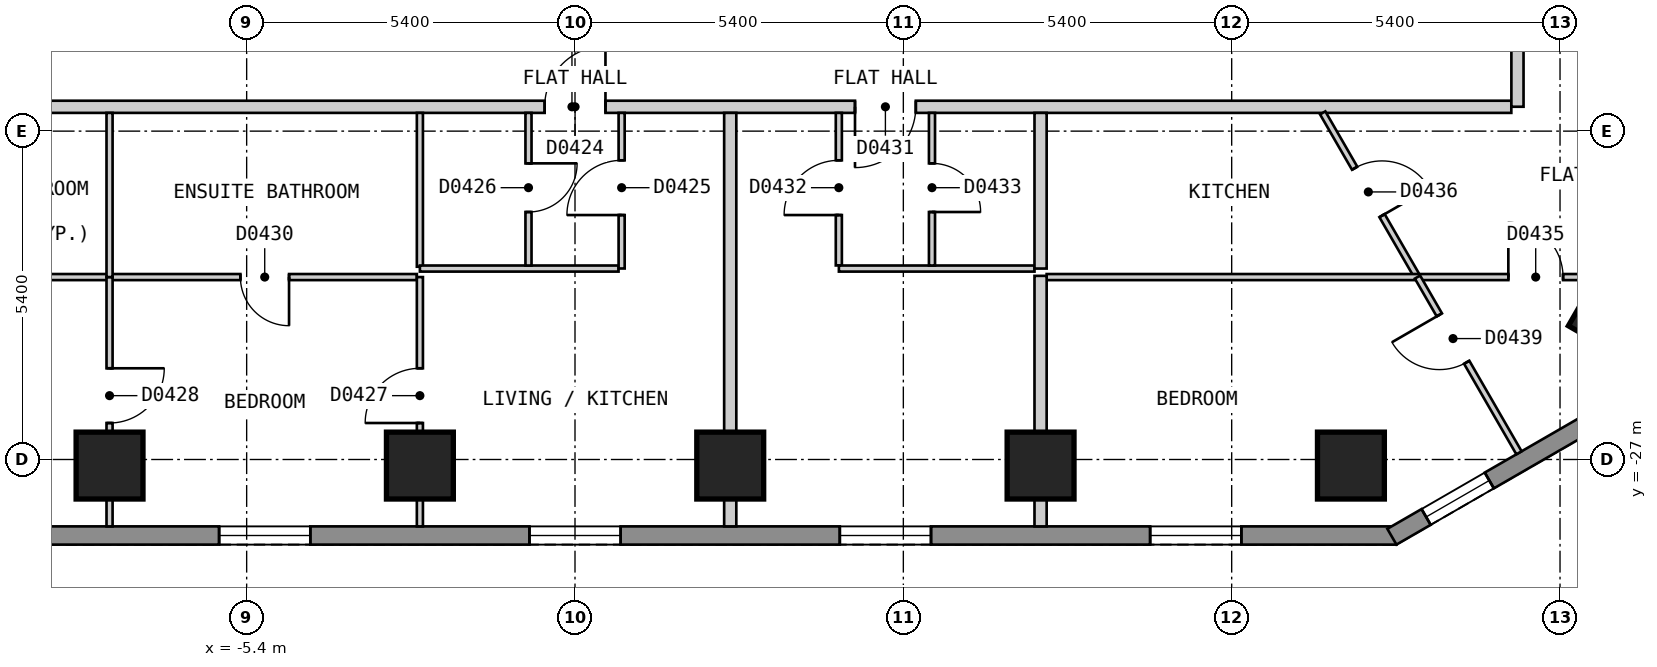
"""IFC4 building model, lengths in metres.
Left out: names, types, materials, properties, quantities, classifications, styles, units other than length and angle.
Written with IfcOpenShell. Run it as: python <this file> out.ifc"""

import sys

from ifc_helpers import new_model, si_unit, direction, frame, frame_2d, origin, origin_2d, place, context, subcontext, project, spatial, polyline, rectangle, outline, extrude, element, fill, save


model = new_model("IFC4")
c1 = context("Model", 3, precision=1e-05, world=origin(), true_north=direction((0.0, 1.0)))
c2 = subcontext(c1, "Body", "Model", "MODEL_VIEW")
j1 = project(units=[si_unit("LENGTHUNIT", "METRE"), si_unit("PLANEANGLEUNIT", "RADIAN")], contexts=[c1])
p1 = place(None, origin())
s1 = spatial("IfcSite", under=j1, at=p1, CompositionType="ELEMENT")
p2 = place(p1, origin())
s2 = spatial("IfcBuilding", under=s1, at=p2, CompositionType="ELEMENT")
p3 = place(p2, frame((0.0, 0.0, 26.4)))
s3 = spatial("IfcBuildingStorey", under=s2, at=p3, CompositionType="ELEMENT", Elevation=26.4)
for number, where, z_axis, x_axis in (
    (1, (-7.655, -27.1, 0.0), (0.0, 0.0, 1.0), (1.0, 0.0, 0.0)),
    (2, (-2.551, -27.1, 0.0), (0.0, 0.0, 1.0), (1.0, 0.0, 0.0)),
    (3, (2.553, -27.1, 0.0), (0.0, 0.0, 1.0), (1.0, 0.0, 0.0)),
    (4, (7.657, -27.1, 0.0), (0.0, 0.0, 1.0), (1.0, 0.0, 0.0)),
    (5, (12.761, -27.1, 0.0), (0.0, 0.0, 1.0), (1.0, 0.0, 0.0)),
    (6, (17.09, -24.6, 0.0), (0.0, 0.0, 1.0), (0.5, 0.866, 0.0)),
):
    element("IfcColumn", number, at=place(p3, frame(where, z_axis=z_axis, x_axis=x_axis)), inside=s3, PredefinedType="COLUMN", context=c2, shape_type="SweptSolid", body=[
        extrude(rectangle(XDim=1.1, YDim=1.1, at=origin_2d()), origin(), (0.0, 0.0, 1.0), 3.0),
    ])
p4 = place(p3, frame((-13.51, -28.25, 0.0), z_axis=(0.0, 0.0, 1.0), x_axis=(1.0, 0.0, 0.0)))
e7 = element("IfcWall", 7, at=p4, inside=s3, PredefinedType="SOLIDWALL", context=c2, shape_type="SweptSolid", body=[
    extrude(outline(polyline([(0.0, -0.15), (27.02, -0.15), (26.94, 0.15), (0.08, 0.15), (0.0, -0.15)])), origin(), (0.0, 0.0, 1.0), 2.7),
])
p5 = place(p4, frame((2.553, 0.0, 0.15)))
e8 = element("IfcOpeningElement", 8, at=p5, cuts=e7, PredefinedType="OPENING", context=c2, shape_type="SweptSolid", body=[
    extrude(rectangle(XDim=1.5, YDim=2.1, at=frame_2d((0.75, 1.05))), frame((0.0, 0.16, 0.0), z_axis=(0.0, -1.0, 0.0), x_axis=(1.0, 0.0, 0.0)), (0.0, 0.0, 1.0), 0.32),
])
p6 = place(p4, frame((7.657, 0.0, 0.15)))
e9 = element("IfcOpeningElement", 9, at=p6, cuts=e7, PredefinedType="OPENING", context=c2, shape_type="SweptSolid", body=[
    extrude(rectangle(XDim=1.5, YDim=2.1, at=frame_2d((0.75, 1.05))), frame((0.0, 0.16, 0.0), z_axis=(0.0, -1.0, 0.0), x_axis=(1.0, 0.0, 0.0)), (0.0, 0.0, 1.0), 0.32),
])
p7 = place(p4, frame((12.761, 0.0, 0.15)))
e10 = element("IfcOpeningElement", 10, at=p7, cuts=e7, PredefinedType="OPENING", context=c2, shape_type="SweptSolid", body=[
    extrude(rectangle(XDim=1.5, YDim=2.1, at=frame_2d((0.75, 1.05))), frame((0.0, 0.16, 0.0), z_axis=(0.0, -1.0, 0.0), x_axis=(1.0, 0.0, 0.0)), (0.0, 0.0, 1.0), 0.32),
])
p8 = place(p4, frame((17.865, 0.0, 0.15)))
e11 = element("IfcOpeningElement", 11, at=p8, cuts=e7, PredefinedType="OPENING", context=c2, shape_type="SweptSolid", body=[
    extrude(rectangle(XDim=1.5, YDim=2.1, at=frame_2d((0.75, 1.05))), frame((0.0, 0.16, 0.0), z_axis=(0.0, -1.0, 0.0), x_axis=(1.0, 0.0, 0.0)), (0.0, 0.0, 1.0), 0.32),
])
p9 = place(p4, frame((22.969, 0.0, 0.15)))
e12 = element("IfcOpeningElement", 12, at=p9, cuts=e7, PredefinedType="OPENING", context=c2, shape_type="SweptSolid", body=[
    extrude(rectangle(XDim=1.5, YDim=2.1, at=frame_2d((0.75, 1.05))), frame((0.0, 0.16, 0.0), z_axis=(0.0, -1.0, 0.0), x_axis=(1.0, 0.0, 0.0)), (0.0, 0.0, 1.0), 0.32),
])
p10 = place(p3, frame((13.435, -28.27, 0.0), z_axis=(0.0, 0.0, 1.0), x_axis=(0.866010750942, 0.50002537861, 0.0)))
e13 = element("IfcWall", 13, at=p10, inside=s3, PredefinedType="SOLIDWALL", context=c2, shape_type="SweptSolid", body=[
    extrude(outline(polyline([(0.0, -0.15), (5.0, -0.15), (4.919, 0.15), (0.08, 0.15), (0.0, -0.15)])), origin(), (0.0, 0.0, 1.0), 2.7),
])
p11 = place(p10, frame((0.65, 0.0, 0.15)))
e14 = element("IfcOpeningElement", 14, at=p11, cuts=e13, PredefinedType="OPENING", context=c2, shape_type="SweptSolid", body=[
    extrude(rectangle(XDim=1.2, YDim=2.1, at=frame_2d((0.6, 1.05))), frame((0.0, 0.16, 0.0), z_axis=(0.0, -1.0, 0.0), x_axis=(1.0, 0.0, 0.0)), (0.0, 0.0, 1.0), 0.32),
])
p12 = place(p3, frame((-15.499, -21.2, 0.0), z_axis=(0.0, 0.0, 1.0), x_axis=(1.0, 0.0, 0.0)))
e15 = element("IfcWall", 15, at=p12, inside=s3, PredefinedType="PARTITIONING", context=c2, shape_type="SweptSolid", body=[
    extrude(rectangle(XDim=30.898, YDim=0.2, at=frame_2d((15.449, 0.0))), origin(), (0.0, 0.0, 1.0), 2.7),
])
p13 = place(p12, frame((15.0, 0.0, 0.0)))
e16 = element("IfcOpeningElement", 16, at=p13, cuts=e15, PredefinedType="OPENING", context=c2, shape_type="SweptSolid", body=[
    extrude(rectangle(XDim=1.0, YDim=2.1, at=frame_2d((0.5, 1.05))), frame((0.0, 0.11, 0.0), z_axis=(0.0, -1.0, 0.0), x_axis=(1.0, 0.0, 0.0)), (0.0, 0.0, 1.0), 0.22),
])
p14 = place(p12, frame((20.104, 0.0, 0.0)))
e17 = element("IfcOpeningElement", 17, at=p14, cuts=e15, PredefinedType="OPENING", context=c2, shape_type="SweptSolid", body=[
    extrude(rectangle(XDim=1.0, YDim=2.1, at=frame_2d((0.5, 1.05))), frame((0.0, 0.11, 0.0), z_axis=(0.0, -1.0, 0.0), x_axis=(1.0, 0.0, 0.0)), (0.0, 0.0, 1.0), 0.22),
])
p15 = place(p3, frame((15.5, -21.199, 0.0), z_axis=(0.0, 0.0, 1.0), x_axis=(0.0, 1.0, 0.0)))
e18 = element("IfcWall", 18, at=p15, inside=s3, PredefinedType="PARTITIONING", context=c2, shape_type="SweptSolid", body=[
    extrude(rectangle(XDim=7.575, YDim=0.2, at=frame_2d((3.788, 0.0))), origin(), (0.0, 0.0, 1.0), 2.7),
])
p16 = place(p15, frame((1.188, 0.0, 0.0)))
e19 = element("IfcOpeningElement", 19, at=p16, cuts=e18, PredefinedType="OPENING", context=c2, shape_type="SweptSolid", body=[
    extrude(rectangle(XDim=1.0, YDim=2.1, at=frame_2d((0.5, 1.05))), frame((0.0, 0.11, 0.0), z_axis=(0.0, -1.0, 0.0), x_axis=(1.0, 0.0, 0.0)), (0.0, 0.0, 1.0), 0.22),
])
p17 = place(p3, frame((12.297, -21.3, 0.0), z_axis=(0.0, 0.0, 1.0), x_axis=(0.500004896655, -0.866022576681, 0.0)))
e20 = element("IfcWall", 20, at=p17, inside=s3, PredefinedType="PARTITIONING", context=c2, shape_type="SweptSolid", body=[
    extrude(rectangle(XDim=3.118, YDim=0.1, at=frame_2d((1.559, 0.0))), origin(), (0.0, 0.0, 1.0), 2.7),
])
p18 = place(p17, frame((1.051, 0.0, 0.0)))
e21 = element("IfcOpeningElement", 21, at=p18, cuts=e20, PredefinedType="OPENING", context=c2, shape_type="SweptSolid", body=[
    extrude(rectangle(XDim=0.9, YDim=2.1, at=frame_2d((0.45, 1.05))), frame((0.0, 0.06, 0.0), z_axis=(0.0, -1.0, 0.0), x_axis=(1.0, 0.0, 0.0)), (0.0, 0.0, 1.0), 0.12),
])
p19 = place(p3, frame((-2.551, -21.3, 0.0), z_axis=(0.0, 0.0, 1.0), x_axis=(0.0, -1.0, 0.0)))
e22 = element("IfcWall", 22, at=p19, inside=s3, PredefinedType="PARTITIONING", context=c2, shape_type="SweptSolid", body=[
    extrude(rectangle(XDim=2.53, YDim=0.1, at=frame_2d((1.265, 0.0))), origin(), (0.0, 0.0, 1.0), 2.7),
])
p20 = place(p3, frame((4.339, -21.3, 0.0), z_axis=(0.0, 0.0, 1.0), x_axis=(0.0, -1.0, 0.0)))
e23 = element("IfcWall", 23, at=p20, inside=s3, PredefinedType="PARTITIONING", context=c2, shape_type="SweptSolid", body=[
    extrude(rectangle(XDim=2.509, YDim=0.1, at=frame_2d((1.254, 0.0))), origin(), (0.0, 0.0, 1.0), 2.7),
])
p21 = place(p20, frame((0.78, 0.0, 0.0)))
e24 = element("IfcOpeningElement", 24, at=p21, cuts=e23, PredefinedType="OPENING", context=c2, shape_type="SweptSolid", body=[
    extrude(rectangle(XDim=0.9, YDim=2.1, at=frame_2d((0.45, 1.05))), frame((0.0, 0.06, 0.0), z_axis=(0.0, -1.0, 0.0), x_axis=(1.0, 0.0, 0.0)), (0.0, 0.0, 1.0), 0.12),
])
p22 = place(p3, frame((-2.551, -23.86, 0.0), z_axis=(0.0, 0.0, 1.0), x_axis=(1.0, 0.0, 0.0)))
e25 = element("IfcWall", 25, at=p22, inside=s3, PredefinedType="PARTITIONING", context=c2, shape_type="SweptSolid", body=[
    extrude(rectangle(XDim=3.267, YDim=0.1, at=frame_2d((1.634, 0.0))), origin(), (0.0, 0.0, 1.0), 2.7),
])
p23 = place(p3, frame((4.34, -23.86, 0.0), z_axis=(0.0, 0.0, 1.0), x_axis=(1.0, 0.0, 0.0)))
e26 = element("IfcWall", 26, at=p23, inside=s3, PredefinedType="PARTITIONING", context=c2, shape_type="SweptSolid", body=[
    extrude(rectangle(XDim=3.217, YDim=0.1, at=frame_2d((1.608, 0.0))), origin(), (0.0, 0.0, 1.0), 2.7),
])
p24 = place(p3, frame((-15.848, -24.0, 0.0), z_axis=(0.0, 0.0, 1.0), x_axis=(1.0, 0.0, 0.0)))
e27 = element("IfcWall", 27, at=p24, inside=s3, PredefinedType="PARTITIONING", context=c2, shape_type="SweptSolid", body=[
    extrude(rectangle(XDim=13.247, YDim=0.1, at=frame_2d((6.624, 0.0))), origin(), (0.0, 0.0, 1.0), 2.7),
])
p25 = place(p24, frame((3.596, 0.0, 0.0)))
e28 = element("IfcOpeningElement", 28, at=p25, cuts=e27, PredefinedType="OPENING", context=c2, shape_type="SweptSolid", body=[
    extrude(rectangle(XDim=0.8, YDim=2.1, at=frame_2d((0.4, 1.05))), frame((0.0, 0.06, 0.0), z_axis=(0.0, -1.0, 0.0), x_axis=(1.0, 0.0, 0.0)), (0.0, 0.0, 1.0), 0.12),
])
p26 = place(p24, frame((10.345, 0.0, 0.0)))
e29 = element("IfcOpeningElement", 29, at=p26, cuts=e27, PredefinedType="OPENING", context=c2, shape_type="SweptSolid", body=[
    extrude(rectangle(XDim=0.8, YDim=2.1, at=frame_2d((0.4, 1.05))), frame((0.0, 0.06, 0.0), z_axis=(0.0, -1.0, 0.0), x_axis=(1.0, 0.0, 0.0)), (0.0, 0.0, 1.0), 0.12),
])
p27 = place(p3, frame((7.757, -24.0, 0.0), z_axis=(0.0, 0.0, 1.0), x_axis=(1.0, 0.0, 0.0)))
e30 = element("IfcWall", 30, at=p27, inside=s3, PredefinedType="PARTITIONING", context=c2, shape_type="SweptSolid", body=[
    extrude(rectangle(XDim=10.493, YDim=0.1, at=frame_2d((5.247, 0.0))), origin(), (0.0, 0.0, 1.0), 2.7),
])
p28 = place(p27, frame((7.593, 0.0, 0.0)))
e31 = element("IfcOpeningElement", 31, at=p28, cuts=e30, PredefinedType="OPENING", context=c2, shape_type="SweptSolid", body=[
    extrude(rectangle(XDim=0.9, YDim=2.1, at=frame_2d((0.45, 1.05))), frame((0.0, 0.06, 0.0), z_axis=(0.0, -1.0, 0.0), x_axis=(1.0, 0.0, 0.0)), (0.0, 0.0, 1.0), 0.12),
])
p29 = place(p3, frame((5.871, -23.81, 0.0), z_axis=(0.0, 0.0, 1.0), x_axis=(0.0, 1.0, 0.0)))
e32 = element("IfcWall", 32, at=p29, inside=s3, PredefinedType="PARTITIONING", context=c2, shape_type="SweptSolid", body=[
    extrude(rectangle(XDim=2.51, YDim=0.1, at=frame_2d((1.255, 0.0))), origin(), (0.0, 0.0, 1.0), 2.7),
])
p30 = place(p29, frame((0.88, 0.0, 0.0)))
e33 = element("IfcOpeningElement", 33, at=p30, cuts=e32, PredefinedType="OPENING", context=c2, shape_type="SweptSolid", body=[
    extrude(rectangle(XDim=0.8, YDim=2.1, at=frame_2d((0.4, 1.05))), frame((0.0, 0.06, 0.0), z_axis=(0.0, -1.0, 0.0), x_axis=(1.0, 0.0, 0.0)), (0.0, 0.0, 1.0), 0.12),
])
p31 = place(p3, frame((0.767, -23.859, 0.0), z_axis=(0.0, 0.0, 1.0), x_axis=(0.0, 1.0, 0.0)))
e34 = element("IfcWall", 34, at=p31, inside=s3, PredefinedType="PARTITIONING", context=c2, shape_type="SweptSolid", body=[
    extrude(rectangle(XDim=2.559, YDim=0.1, at=frame_2d((1.279, 0.0))), origin(), (0.0, 0.0, 1.0), 2.7),
])
p32 = place(p31, frame((0.879, 0.0, 0.0)))
e35 = element("IfcOpeningElement", 35, at=p32, cuts=e34, PredefinedType="OPENING", context=c2, shape_type="SweptSolid", body=[
    extrude(rectangle(XDim=0.9, YDim=2.1, at=frame_2d((0.45, 1.05))), frame((0.0, 0.06, 0.0), z_axis=(0.0, -1.0, 0.0), x_axis=(1.0, 0.0, 0.0)), (0.0, 0.0, 1.0), 0.12),
])
p33 = place(p3, frame((-0.765, -23.81, 0.0), z_axis=(0.0, 0.0, 1.0), x_axis=(0.0, 1.0, 0.0)))
e36 = element("IfcWall", 36, at=p33, inside=s3, PredefinedType="PARTITIONING", context=c2, shape_type="SweptSolid", body=[
    extrude(rectangle(XDim=2.51, YDim=0.1, at=frame_2d((1.255, 0.0))), origin(), (0.0, 0.0, 1.0), 2.7),
])
p34 = place(p33, frame((0.88, 0.0, 0.0)))
e37 = element("IfcOpeningElement", 37, at=p34, cuts=e36, PredefinedType="OPENING", context=c2, shape_type="SweptSolid", body=[
    extrude(rectangle(XDim=0.8, YDim=2.1, at=frame_2d((0.4, 1.05))), frame((0.0, 0.06, 0.0), z_axis=(0.0, -1.0, 0.0), x_axis=(1.0, 0.0, 0.0)), (0.0, 0.0, 1.0), 0.12),
])
p35 = place(p3, frame((-7.655, -28.1, 0.0), z_axis=(0.0, 0.0, 1.0), x_axis=(0.0, 1.0, 0.0)))
e38 = element("IfcWall", 38, at=p35, inside=s3, PredefinedType="PARTITIONING", context=c2, shape_type="SweptSolid", body=[
    extrude(rectangle(XDim=4.1, YDim=0.1, at=frame_2d((2.05, 0.0))), origin(), (0.0, 0.0, 1.0), 2.7),
])
p36 = place(p35, frame((1.7, 0.0, 0.0)))
e39 = element("IfcOpeningElement", 39, at=p36, cuts=e38, PredefinedType="OPENING", context=c2, shape_type="SweptSolid", body=[
    extrude(rectangle(XDim=0.9, YDim=2.1, at=frame_2d((0.45, 1.05))), frame((0.0, 0.06, 0.0), z_axis=(0.0, -1.0, 0.0), x_axis=(1.0, 0.0, 0.0)), (0.0, 0.0, 1.0), 0.12),
])
p37 = place(p3, frame((-2.551, -28.1, 0.0), z_axis=(0.0, 0.0, 1.0), x_axis=(0.0, 1.0, 0.0)))
e40 = element("IfcWall", 40, at=p37, inside=s3, PredefinedType="PARTITIONING", context=c2, shape_type="SweptSolid", body=[
    extrude(rectangle(XDim=4.1, YDim=0.1, at=frame_2d((2.05, 0.0))), origin(), (0.0, 0.0, 1.0), 2.7),
])
p38 = place(p37, frame((1.7, 0.0, 0.0)))
e41 = element("IfcOpeningElement", 41, at=p38, cuts=e40, PredefinedType="OPENING", context=c2, shape_type="SweptSolid", body=[
    extrude(rectangle(XDim=0.9, YDim=2.1, at=frame_2d((0.45, 1.05))), frame((0.0, 0.06, 0.0), z_axis=(0.0, -1.0, 0.0), x_axis=(1.0, 0.0, 0.0)), (0.0, 0.0, 1.0), 0.12),
])
p39 = place(p3, frame((2.553, -21.3, 0.0), z_axis=(0.0, 0.0, 1.0), x_axis=(0.0, -1.0, 0.0)))
e42 = element("IfcWall", 42, at=p39, inside=s3, PredefinedType="PARTITIONING", context=c2, shape_type="SweptSolid", body=[
    extrude(rectangle(XDim=6.8, YDim=0.2, at=frame_2d((3.4, 0.0))), origin(), (0.0, 0.0, 1.0), 2.7),
])
p40 = place(p3, frame((7.657, -28.1, 0.0), z_axis=(0.0, 0.0, 1.0), x_axis=(0.0, 1.0, 0.0)))
e43 = element("IfcWall", 43, at=p40, inside=s3, PredefinedType="PARTITIONING", context=c2, shape_type="SweptSolid", body=[
    extrude(rectangle(XDim=4.12, YDim=0.2, at=frame_2d((2.06, 0.0))), origin(), (0.0, 0.0, 1.0), 2.7),
])
p41 = place(p3, frame((7.657, -23.86, 0.0), z_axis=(0.0, 0.0, 1.0), x_axis=(0.0, 1.0, 0.0)))
e44 = element("IfcWall", 44, at=p41, inside=s3, PredefinedType="PARTITIONING", context=c2, shape_type="SweptSolid", body=[
    extrude(rectangle(XDim=2.56, YDim=0.2, at=frame_2d((1.28, 0.0))), origin(), (0.0, 0.0, 1.0), 2.7),
])
p42 = place(p3, frame((13.856, -24.0, 0.0), z_axis=(0.0, 0.0, 1.0), x_axis=(0.50010451262, -0.865965054986, 0.0)))
e45 = element("IfcWall", 45, at=p42, inside=s3, PredefinedType="PARTITIONING", context=c2, shape_type="SweptSolid", body=[
    extrude(rectangle(XDim=3.337, YDim=0.1, at=frame_2d((1.668, 0.0))), origin(), (0.0, 0.0, 1.0), 2.7),
])
p43 = place(p42, frame((0.718, 0.0, 0.0)))
e46 = element("IfcOpeningElement", 46, at=p43, cuts=e45, PredefinedType="OPENING", context=c2, shape_type="SweptSolid", body=[
    extrude(rectangle(XDim=0.9, YDim=2.1, at=frame_2d((0.45, 1.05))), frame((0.0, 0.06, 0.0), z_axis=(0.0, -1.0, 0.0), x_axis=(1.0, 0.0, 0.0)), (0.0, 0.0, 1.0), 0.12),
])
p44 = place(p3, frame((-7.655, -24.0, 0.0), z_axis=(0.0, 0.0, 1.0), x_axis=(0.0, 1.0, 0.0)))
e47 = element("IfcWall", 47, at=p44, inside=s3, PredefinedType="PARTITIONING", context=c2, shape_type="SweptSolid", body=[
    extrude(rectangle(XDim=2.7, YDim=0.1, at=frame_2d((1.35, 0.0))), origin(), (0.0, 0.0, 1.0), 2.7),
])
p45 = place(p6, origin())
e48 = element("IfcWindow", 48, at=p45, inside=s3, PartitioningType="SINGLE_PANEL", PredefinedType="WINDOW", context=c2, shape_type="SweptSolid", body=[
    extrude(rectangle(XDim=1.5, YDim=2.1, at=frame_2d((0.75, 1.05))), frame((0.0, 0.03, 0.0), z_axis=(0.0, -1.0, 0.0), x_axis=(1.0, 0.0, 0.0)), (0.0, 0.0, 1.0), 0.06),
])
fill(e9, e48)
p46 = place(p7, origin())
e49 = element("IfcWindow", 49, at=p46, inside=s3, PartitioningType="SINGLE_PANEL", PredefinedType="WINDOW", context=c2, shape_type="SweptSolid", body=[
    extrude(rectangle(XDim=1.5, YDim=2.1, at=frame_2d((0.75, 1.05))), frame((0.0, 0.03, 0.0), z_axis=(0.0, -1.0, 0.0), x_axis=(1.0, 0.0, 0.0)), (0.0, 0.0, 1.0), 0.06),
])
fill(e10, e49)
p47 = place(p8, origin())
e50 = element("IfcWindow", 50, at=p47, inside=s3, PartitioningType="SINGLE_PANEL", PredefinedType="WINDOW", context=c2, shape_type="SweptSolid", body=[
    extrude(rectangle(XDim=1.5, YDim=2.1, at=frame_2d((0.75, 1.05))), frame((0.0, 0.03, 0.0), z_axis=(0.0, -1.0, 0.0), x_axis=(1.0, 0.0, 0.0)), (0.0, 0.0, 1.0), 0.06),
])
fill(e11, e50)
p48 = place(p9, origin())
e51 = element("IfcWindow", 51, at=p48, inside=s3, PartitioningType="SINGLE_PANEL", PredefinedType="WINDOW", context=c2, shape_type="SweptSolid", body=[
    extrude(rectangle(XDim=1.5, YDim=2.1, at=frame_2d((0.75, 1.05))), frame((0.0, 0.03, 0.0), z_axis=(0.0, -1.0, 0.0), x_axis=(1.0, 0.0, 0.0)), (0.0, 0.0, 1.0), 0.06),
])
fill(e12, e51)
p49 = place(p11, origin())
e52 = element("IfcWindow", 52, at=p49, inside=s3, PartitioningType="SINGLE_PANEL", PredefinedType="WINDOW", context=c2, shape_type="SweptSolid", body=[
    extrude(rectangle(XDim=1.2, YDim=2.1, at=frame_2d((0.6, 1.05))), frame((0.0, 0.03, 0.0), z_axis=(0.0, -1.0, 0.0), x_axis=(1.0, 0.0, 0.0)), (0.0, 0.0, 1.0), 0.06),
])
fill(e14, e52)
p50 = place(p13, origin())
e53 = element("IfcDoor", 53, at=p50, inside=s3, OperationType="SINGLE_SWING_RIGHT", PredefinedType="DOOR", context=c2, shape_type="SweptSolid", body=[
    extrude(rectangle(XDim=1.0, YDim=2.1, at=frame_2d((0.5, 1.05))), frame((0.0, 0.025, 0.0), z_axis=(0.0, -1.0, 0.0), x_axis=(1.0, 0.0, 0.0)), (0.0, 0.0, 1.0), 0.05),
])
fill(e16, e53)
p51 = place(p32, origin())
e54 = element("IfcDoor", 54, at=p51, inside=s3, OperationType="SINGLE_SWING_LEFT", PredefinedType="DOOR", context=c2, shape_type="SweptSolid", body=[
    extrude(rectangle(XDim=0.9, YDim=2.1, at=frame_2d((0.45, 1.05))), frame((0.0, 0.025, 0.0), z_axis=(0.0, -1.0, 0.0), x_axis=(1.0, 0.0, 0.0)), (0.0, 0.0, 1.0), 0.05),
])
fill(e35, e54)
p52 = place(p34, origin())
e55 = element("IfcDoor", 55, at=p52, inside=s3, OperationType="SINGLE_SWING_RIGHT", PredefinedType="DOOR", context=c2, shape_type="SweptSolid", body=[
    extrude(rectangle(XDim=0.8, YDim=2.1, at=frame_2d((0.4, 1.05))), frame((0.0, 0.025, 0.0), z_axis=(0.0, -1.0, 0.0), x_axis=(1.0, 0.0, 0.0)), (0.0, 0.0, 1.0), 0.05),
])
fill(e37, e55)
p53 = place(p38, origin())
e56 = element("IfcDoor", 56, at=p53, inside=s3, OperationType="SINGLE_SWING_LEFT", PredefinedType="DOOR", context=c2, shape_type="SweptSolid", body=[
    extrude(rectangle(XDim=0.9, YDim=2.1, at=frame_2d((0.45, 1.05))), frame((0.0, 0.025, 0.0), z_axis=(0.0, -1.0, 0.0), x_axis=(1.0, 0.0, 0.0)), (0.0, 0.0, 1.0), 0.05),
])
fill(e41, e56)
p54 = place(p36, origin())
e57 = element("IfcDoor", 57, at=p54, inside=s3, OperationType="SINGLE_SWING_RIGHT", PredefinedType="DOOR", context=c2, shape_type="SweptSolid", body=[
    extrude(rectangle(XDim=0.9, YDim=2.1, at=frame_2d((0.45, 1.05))), frame((0.0, 0.025, 0.0), z_axis=(0.0, -1.0, 0.0), x_axis=(1.0, 0.0, 0.0)), (0.0, 0.0, 1.0), 0.05),
])
fill(e39, e57)
p55 = place(p26, origin())
e58 = element("IfcDoor", 58, at=p55, inside=s3, OperationType="SINGLE_SWING_RIGHT", PredefinedType="DOOR", context=c2, shape_type="SweptSolid", body=[
    extrude(rectangle(XDim=0.8, YDim=2.1, at=frame_2d((0.4, 1.05))), frame((0.0, 0.025, 0.0), z_axis=(0.0, -1.0, 0.0), x_axis=(1.0, 0.0, 0.0)), (0.0, 0.0, 1.0), 0.05),
])
fill(e29, e58)
p56 = place(p14, origin())
e59 = element("IfcDoor", 59, at=p56, inside=s3, OperationType="SINGLE_SWING_LEFT", PredefinedType="DOOR", context=c2, shape_type="SweptSolid", body=[
    extrude(rectangle(XDim=1.0, YDim=2.1, at=frame_2d((0.5, 1.05))), frame((0.0, 0.025, 0.0), z_axis=(0.0, -1.0, 0.0), x_axis=(1.0, 0.0, 0.0)), (0.0, 0.0, 1.0), 0.05),
])
fill(e17, e59)
p57 = place(p21, origin())
e60 = element("IfcDoor", 60, at=p57, inside=s3, OperationType="SINGLE_SWING_RIGHT", PredefinedType="DOOR", context=c2, shape_type="SweptSolid", body=[
    extrude(rectangle(XDim=0.9, YDim=2.1, at=frame_2d((0.45, 1.05))), frame((0.0, 0.025, 0.0), z_axis=(0.0, -1.0, 0.0), x_axis=(1.0, 0.0, 0.0)), (0.0, 0.0, 1.0), 0.05),
])
fill(e24, e60)
p58 = place(p30, origin())
e61 = element("IfcDoor", 61, at=p58, inside=s3, OperationType="SINGLE_SWING_LEFT", PredefinedType="DOOR", context=c2, shape_type="SweptSolid", body=[
    extrude(rectangle(XDim=0.8, YDim=2.1, at=frame_2d((0.4, 1.05))), frame((0.0, 0.025, 0.0), z_axis=(0.0, -1.0, 0.0), x_axis=(1.0, 0.0, 0.0)), (0.0, 0.0, 1.0), 0.05),
])
fill(e33, e61)
p59 = place(p28, origin())
e62 = element("IfcDoor", 62, at=p59, inside=s3, OperationType="SINGLE_SWING_LEFT", PredefinedType="DOOR", context=c2, shape_type="SweptSolid", body=[
    extrude(rectangle(XDim=0.9, YDim=2.1, at=frame_2d((0.45, 1.05))), frame((0.0, 0.025, 0.0), z_axis=(0.0, -1.0, 0.0), x_axis=(1.0, 0.0, 0.0)), (0.0, 0.0, 1.0), 0.05),
])
fill(e31, e62)
p60 = place(p18, origin())
e63 = element("IfcDoor", 63, at=p60, inside=s3, OperationType="SINGLE_SWING_RIGHT", PredefinedType="DOOR", context=c2, shape_type="SweptSolid", body=[
    extrude(rectangle(XDim=0.9, YDim=2.1, at=frame_2d((0.45, 1.05))), frame((0.0, 0.025, 0.0), z_axis=(0.0, -1.0, 0.0), x_axis=(1.0, 0.0, 0.0)), (0.0, 0.0, 1.0), 0.05),
])
fill(e21, e63)
p61 = place(p43, origin())
e64 = element("IfcDoor", 64, at=p61, inside=s3, OperationType="SINGLE_SWING_LEFT", PredefinedType="DOOR", context=c2, shape_type="SweptSolid", body=[
    extrude(rectangle(XDim=0.9, YDim=2.1, at=frame_2d((0.45, 1.05))), frame((0.0, 0.025, 0.0), z_axis=(0.0, -1.0, 0.0), x_axis=(1.0, 0.0, 0.0)), (0.0, 0.0, 1.0), 0.05),
])
fill(e46, e64)
save(model, sys.argv[1])
